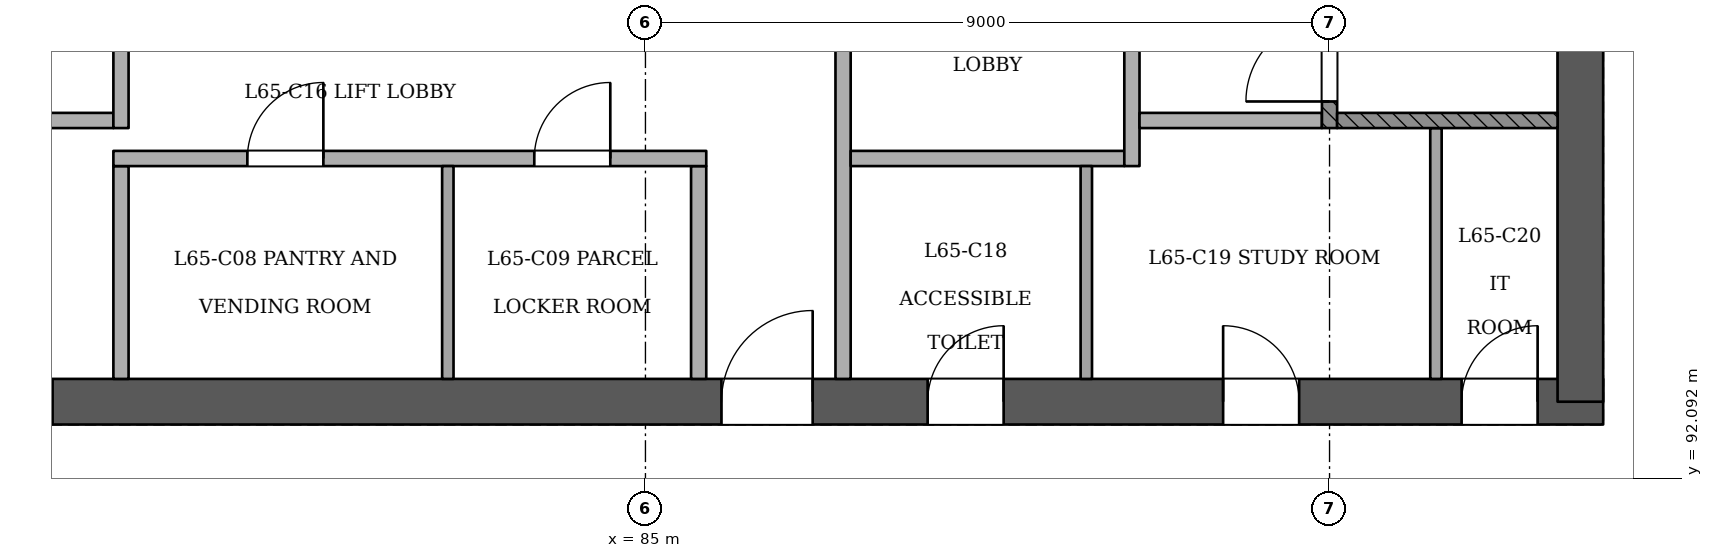
"""IFC4 building model, lengths in metres.
Left out: names, types, materials, properties, quantities, classifications, styles, units other than length and angle.
Written with IfcOpenShell. Run it as: python <this file> out.ifc"""

import sys

from ifc_helpers import new_model, si_unit, direction, frame, frame_2d, origin, place, context, subcontext, project, spatial, rectangle, extrude, element, fill, save


model = new_model("IFC4")
c1 = context("Model", 3, precision=1e-05, world=origin(), true_north=direction((0.0, 1.0)))
c2 = subcontext(c1, "Body", "Model", "MODEL_VIEW")
j1 = project(units=[si_unit("LENGTHUNIT", "METRE"), si_unit("PLANEANGLEUNIT", "RADIAN")], contexts=[c1])
p1 = place(None, origin())
s1 = spatial("IfcSite", under=j1, at=p1, CompositionType="ELEMENT")
p2 = place(p1, origin())
s2 = spatial("IfcBuilding", under=s1, at=p2, CompositionType="ELEMENT")
p3 = place(p2, frame((0.0, 0.0, 253.6)))
s3 = spatial("IfcBuildingStorey", under=s2, at=p3, CompositionType="ELEMENT", Elevation=253.6)
p4 = place(p3, frame((72.7, 93.1, 0.0), z_axis=(0.0, 0.0, 1.0), x_axis=(1.0, 0.0, 0.0)))
e1 = element("IfcWall", 1, at=p4, inside=s3, PredefinedType="SHEAR", context=c2, shape_type="SweptSolid", body=[
    extrude(rectangle(XDim=24.9, YDim=0.6, at=frame_2d((12.45, 0.0))), origin(), (0.0, 0.0, 1.0), 3.6),
])
p5 = place(p4, frame((1.1, 0.0, 0.0)))
e2 = element("IfcOpeningElement", 2, at=p5, cuts=e1, PredefinedType="OPENING", context=c2, shape_type="SweptSolid", body=[
    extrude(rectangle(XDim=1.2, YDim=2.1, at=frame_2d((0.6, 1.05))), frame((0.0, 0.311, 0.0), z_axis=(0.0, -1.0, 0.0), x_axis=(1.0, 0.0, 0.0)), (0.0, 0.0, 1.0), 0.621),
])
p6 = place(p4, frame((3.3, 0.0, 0.0)))
e3 = element("IfcOpeningElement", 3, at=p6, cuts=e1, PredefinedType="OPENING", context=c2, shape_type="SweptSolid", body=[
    extrude(rectangle(XDim=1.2, YDim=2.1, at=frame_2d((0.6, 1.05))), frame((0.0, 0.311, 0.0), z_axis=(0.0, -1.0, 0.0), x_axis=(1.0, 0.0, 0.0)), (0.0, 0.0, 1.0), 0.621),
])
p7 = place(p4, frame((13.3, 0.0, 0.0)))
e4 = element("IfcOpeningElement", 4, at=p7, cuts=e1, PredefinedType="OPENING", context=c2, shape_type="SweptSolid", body=[
    extrude(rectangle(XDim=1.2, YDim=2.1, at=frame_2d((0.6, 1.05))), frame((0.0, 0.311, 0.0), z_axis=(0.0, -1.0, 0.0), x_axis=(1.0, 0.0, 0.0)), (0.0, 0.0, 1.0), 0.621),
])
p8 = place(p4, frame((16.012, 0.0, 0.0)))
e5 = element("IfcOpeningElement", 5, at=p8, cuts=e1, PredefinedType="OPENING", context=c2, shape_type="SweptSolid", body=[
    extrude(rectangle(XDim=1.0, YDim=2.1, at=frame_2d((0.5, 1.05))), frame((0.0, 0.311, 0.0), z_axis=(0.0, -1.0, 0.0), x_axis=(1.0, 0.0, 0.0)), (0.0, 0.0, 1.0), 0.621),
])
p9 = place(p4, frame((19.9, 0.0, 0.0)))
e6 = element("IfcOpeningElement", 6, at=p9, cuts=e1, PredefinedType="OPENING", context=c2, shape_type="SweptSolid", body=[
    extrude(rectangle(XDim=1.0, YDim=2.1, at=frame_2d((0.5, 1.05))), frame((0.0, 0.311, 0.0), z_axis=(0.0, -1.0, 0.0), x_axis=(1.0, 0.0, 0.0)), (0.0, 0.0, 1.0), 0.621),
])
p10 = place(p4, frame((23.038, 0.0, 0.0)))
e7 = element("IfcOpeningElement", 7, at=p10, cuts=e1, PredefinedType="OPENING", context=c2, shape_type="SweptSolid", body=[
    extrude(rectangle(XDim=1.0, YDim=2.1, at=frame_2d((0.5, 1.05))), frame((0.0, 0.311, 0.0), z_axis=(0.0, -1.0, 0.0), x_axis=(1.0, 0.0, 0.0)), (0.0, 0.0, 1.0), 0.621),
])
p11 = place(p3, frame((97.3, 93.1, 0.0), z_axis=(0.0, 0.0, 1.0), x_axis=(0.0, 1.0, 0.0)))
e8 = element("IfcWall", 8, at=p11, inside=s3, PredefinedType="SHEAR", context=c2, shape_type="SweptSolid", body=[
    extrude(rectangle(XDim=10.9, YDim=0.6, at=frame_2d((5.45, 0.0))), origin(), (0.0, 0.0, 1.0), 3.6),
])
p12 = place(p3, frame((78.1, 93.4, 0.0), z_axis=(0.0, 0.0, 1.0), x_axis=(0.0, 1.0, 0.0)))
e9 = element("IfcWall", 9, at=p12, inside=s3, PredefinedType="PARTITIONING", context=c2, shape_type="SweptSolid", body=[
    extrude(rectangle(XDim=2.8, YDim=0.2, at=frame_2d((1.4, 0.0))), origin(), (0.0, 0.0, 1.0), 3.2),
])
p13 = place(p3, frame((82.4, 93.4, 0.0), z_axis=(0.0, 0.0, 1.0), x_axis=(0.0, 1.0, 0.0)))
e10 = element("IfcWall", 10, at=p13, inside=s3, PredefinedType="PARTITIONING", context=c2, shape_type="SweptSolid", body=[
    extrude(rectangle(XDim=2.8, YDim=0.15, at=frame_2d((1.4, 0.0))), origin(), (0.0, 0.0, 1.0), 3.2),
])
p14 = place(p3, frame((85.7, 93.4, 0.0), z_axis=(0.0, 0.0, 1.0), x_axis=(0.0, 1.0, 0.0)))
e11 = element("IfcWall", 11, at=p14, inside=s3, PredefinedType="PARTITIONING", context=c2, shape_type="SweptSolid", body=[
    extrude(rectangle(XDim=2.8, YDim=0.2, at=frame_2d((1.4, 0.0))), origin(), (0.0, 0.0, 1.0), 3.2),
])
p15 = place(p3, frame((87.6, 93.4, 0.0), z_axis=(0.0, 0.0, 1.0), x_axis=(0.0, 1.0, 0.0)))
e12 = element("IfcWall", 12, at=p15, inside=s3, PredefinedType="PARTITIONING", context=c2, shape_type="SweptSolid", body=[
    extrude(rectangle(XDim=7.0, YDim=0.2, at=frame_2d((3.5, 0.0))), origin(), (0.0, 0.0, 1.0), 3.2),
])
p16 = place(p15, frame((4.45, 0.0, 0.0)))
e13 = element("IfcOpeningElement", 13, at=p16, cuts=e12, PredefinedType="OPENING", context=c2, shape_type="SweptSolid", body=[
    extrude(rectangle(XDim=1.1, YDim=2.1, at=frame_2d((0.55, 1.05))), frame((0.0, 0.11, 0.0), z_axis=(0.0, -1.0, 0.0), x_axis=(1.0, 0.0, 0.0)), (0.0, 0.0, 1.0), 0.221),
])
p17 = place(p3, frame((90.8, 93.4, 0.0), z_axis=(0.0, 0.0, 1.0), x_axis=(0.0, 1.0, 0.0)))
e14 = element("IfcWall", 14, at=p17, inside=s3, PredefinedType="PARTITIONING", context=c2, shape_type="SweptSolid", body=[
    extrude(rectangle(XDim=2.8, YDim=0.15, at=frame_2d((1.4, 0.0))), origin(), (0.0, 0.0, 1.0), 3.2),
])
p18 = place(p3, frame((95.4, 93.4, 0.0), z_axis=(0.0, 0.0, 1.0), x_axis=(0.0, 1.0, 0.0)))
e15 = element("IfcWall", 15, at=p18, inside=s3, PredefinedType="PARTITIONING", context=c2, shape_type="SweptSolid", body=[
    extrude(rectangle(XDim=3.3, YDim=0.15, at=frame_2d((1.65, 0.0))), origin(), (0.0, 0.0, 1.0), 3.2),
])
p19 = place(p3, frame((78.0, 96.3, 0.0), z_axis=(0.0, 0.0, 1.0), x_axis=(1.0, 0.0, 0.0)))
e16 = element("IfcWall", 16, at=p19, inside=s3, PredefinedType="PARTITIONING", context=c2, shape_type="SweptSolid", body=[
    extrude(rectangle(XDim=7.8, YDim=0.2, at=frame_2d((3.9, 0.0))), origin(), (0.0, 0.0, 1.0), 3.2),
])
p20 = place(p19, frame((1.762, 0.0, 0.0)))
e17 = element("IfcOpeningElement", 17, at=p20, cuts=e16, PredefinedType="OPENING", context=c2, shape_type="SweptSolid", body=[
    extrude(rectangle(XDim=1.0, YDim=2.1, at=frame_2d((0.5, 1.05))), frame((0.0, 0.11, 0.0), z_axis=(0.0, -1.0, 0.0), x_axis=(1.0, 0.0, 0.0)), (0.0, 0.0, 1.0), 0.221),
])
p21 = place(p19, frame((5.538, 0.0, 0.0)))
e18 = element("IfcOpeningElement", 18, at=p21, cuts=e16, PredefinedType="OPENING", context=c2, shape_type="SweptSolid", body=[
    extrude(rectangle(XDim=1.0, YDim=2.1, at=frame_2d((0.5, 1.05))), frame((0.0, 0.11, 0.0), z_axis=(0.0, -1.0, 0.0), x_axis=(1.0, 0.0, 0.0)), (0.0, 0.0, 1.0), 0.221),
])
p22 = place(p3, frame((87.7, 96.3, 0.0), z_axis=(0.0, 0.0, 1.0), x_axis=(1.0, 0.0, 0.0)))
e19 = element("IfcWall", 19, at=p22, inside=s3, PredefinedType="PARTITIONING", context=c2, shape_type="SweptSolid", body=[
    extrude(rectangle(XDim=3.6, YDim=0.2, at=frame_2d((1.8, 0.0))), origin(), (0.0, 0.0, 1.0), 3.2),
])
p23 = place(p3, frame((91.4, 96.2, 0.0), z_axis=(0.0, 0.0, 1.0), x_axis=(0.0, 1.0, 0.0)))
e20 = element("IfcWall", 20, at=p23, inside=s3, PredefinedType="PARTITIONING", context=c2, shape_type="SweptSolid", body=[
    extrude(rectangle(XDim=4.2, YDim=0.2, at=frame_2d((2.1, 0.0))), origin(), (0.0, 0.0, 1.0), 3.2),
])
p24 = place(p23, frame((2.45, 0.0, 0.0)))
e21 = element("IfcOpeningElement", 21, at=p24, cuts=e20, PredefinedType="OPENING", context=c2, shape_type="SweptSolid", body=[
    extrude(rectangle(XDim=1.1, YDim=2.1, at=frame_2d((0.55, 1.05))), frame((0.0, 0.11, 0.0), z_axis=(0.0, -1.0, 0.0), x_axis=(1.0, 0.0, 0.0)), (0.0, 0.0, 1.0), 0.221),
])
p25 = place(p3, frame((76.1, 96.8, 0.0), z_axis=(0.0, 0.0, 1.0), x_axis=(1.0, 0.0, 0.0)))
e22 = element("IfcWall", 22, at=p25, inside=s3, PredefinedType="PARTITIONING", context=c2, shape_type="SweptSolid", body=[
    extrude(rectangle(XDim=1.9, YDim=0.2, at=frame_2d((0.95, 0.0))), origin(), (0.0, 0.0, 1.0), 3.2),
])
p26 = place(p3, frame((78.1, 96.7, 0.0), z_axis=(0.0, 0.0, 1.0), x_axis=(0.0, 1.0, 0.0)))
e23 = element("IfcWall", 23, at=p26, inside=s3, PredefinedType="PARTITIONING", context=c2, shape_type="SweptSolid", body=[
    extrude(rectangle(XDim=3.7, YDim=0.2, at=frame_2d((1.85, 0.0))), origin(), (0.0, 0.0, 1.0), 3.2),
])
p27 = place(p26, frame((1.95, 0.0, 0.0)))
e24 = element("IfcOpeningElement", 24, at=p27, cuts=e23, PredefinedType="OPENING", context=c2, shape_type="SweptSolid", body=[
    extrude(rectangle(XDim=1.1, YDim=2.1, at=frame_2d((0.55, 1.05))), frame((0.0, 0.11, 0.0), z_axis=(0.0, -1.0, 0.0), x_axis=(1.0, 0.0, 0.0)), (0.0, 0.0, 1.0), 0.221),
])
p28 = place(p3, frame((91.5, 96.8, 0.0), z_axis=(0.0, 0.0, 1.0), x_axis=(1.0, 0.0, 0.0)))
e25 = element("IfcWall", 25, at=p28, inside=s3, PredefinedType="PARTITIONING", context=c2, shape_type="SweptSolid", body=[
    extrude(rectangle(XDim=2.4, YDim=0.2, at=frame_2d((1.2, 0.0))), origin(), (0.0, 0.0, 1.0), 3.2),
])
p29 = place(p3, frame((94.0, 96.7, 0.0), z_axis=(0.0, 0.0, 1.0), x_axis=(0.0, 1.0, 0.0)))
e26 = element("IfcWall", 26, at=p29, inside=s3, PredefinedType="SOLIDWALL", context=c2, shape_type="SweptSolid", body=[
    extrude(rectangle(XDim=3.7, YDim=0.2, at=frame_2d((1.85, 0.0))), origin(), (0.0, 0.0, 1.0), 3.2),
])
p30 = place(p29, frame((0.35, 0.0, 0.0)))
e27 = element("IfcOpeningElement", 27, at=p30, cuts=e26, PredefinedType="OPENING", context=c2, shape_type="SweptSolid", body=[
    extrude(rectangle(XDim=1.1, YDim=2.1, at=frame_2d((0.55, 1.05))), frame((0.0, 0.11, 0.0), z_axis=(0.0, -1.0, 0.0), x_axis=(1.0, 0.0, 0.0)), (0.0, 0.0, 1.0), 0.221),
])
p31 = place(p3, frame((94.1, 96.8, 0.0), z_axis=(0.0, 0.0, 1.0), x_axis=(1.0, 0.0, 0.0)))
e28 = element("IfcWall", 28, at=p31, inside=s3, PredefinedType="SOLIDWALL", context=c2, shape_type="SweptSolid", body=[
    extrude(rectangle(XDim=2.9, YDim=0.2, at=frame_2d((1.45, 0.0))), origin(), (0.0, 0.0, 1.0), 3.2),
])
p32 = place(p30, origin())
e29 = element("IfcDoor", 29, at=p32, inside=s3, OperationType="SINGLE_SWING_LEFT", PredefinedType="NOTDEFINED", context=c2, shape_type="SweptSolid", body=[
    extrude(rectangle(XDim=1.1, YDim=2.1, at=frame_2d((0.55, 1.05))), frame((0.0, 0.025, 0.0), z_axis=(0.0, -1.0, 0.0), x_axis=(1.0, 0.0, 0.0)), (0.0, 0.0, 1.0), 0.05),
])
fill(e27, e29)
p33 = place(p6, origin())
e30 = element("IfcDoor", 30, at=p33, inside=s3, OperationType="SINGLE_SWING_LEFT", PredefinedType="NOTDEFINED", context=c2, shape_type="SweptSolid", body=[
    extrude(rectangle(XDim=1.2, YDim=2.1, at=frame_2d((0.6, 1.05))), frame((0.0, 0.025, 0.0), z_axis=(0.0, -1.0, 0.0), x_axis=(1.0, 0.0, 0.0)), (0.0, 0.0, 1.0), 0.05),
])
fill(e3, e30)
p34 = place(p7, origin())
e31 = element("IfcDoor", 31, at=p34, inside=s3, OperationType="SINGLE_SWING_RIGHT", PredefinedType="NOTDEFINED", context=c2, shape_type="SweptSolid", body=[
    extrude(rectangle(XDim=1.2, YDim=2.1, at=frame_2d((0.6, 1.05))), frame((0.0, 0.025, 0.0), z_axis=(0.0, -1.0, 0.0), x_axis=(1.0, 0.0, 0.0)), (0.0, 0.0, 1.0), 0.05),
])
fill(e4, e31)
p35 = place(p8, origin())
e32 = element("IfcDoor", 32, at=p35, inside=s3, OperationType="SINGLE_SWING_RIGHT", PredefinedType="NOTDEFINED", context=c2, shape_type="SweptSolid", body=[
    extrude(rectangle(XDim=1.0, YDim=2.1, at=frame_2d((0.5, 1.05))), frame((0.0, 0.025, 0.0), z_axis=(0.0, -1.0, 0.0), x_axis=(1.0, 0.0, 0.0)), (0.0, 0.0, 1.0), 0.05),
])
fill(e5, e32)
p36 = place(p9, origin())
e33 = element("IfcDoor", 33, at=p36, inside=s3, OperationType="SINGLE_SWING_LEFT", PredefinedType="NOTDEFINED", context=c2, shape_type="SweptSolid", body=[
    extrude(rectangle(XDim=1.0, YDim=2.1, at=frame_2d((0.5, 1.05))), frame((0.0, 0.025, 0.0), z_axis=(0.0, -1.0, 0.0), x_axis=(1.0, 0.0, 0.0)), (0.0, 0.0, 1.0), 0.05),
])
fill(e6, e33)
p37 = place(p10, origin())
e34 = element("IfcDoor", 34, at=p37, inside=s3, OperationType="SINGLE_SWING_RIGHT", PredefinedType="NOTDEFINED", context=c2, shape_type="SweptSolid", body=[
    extrude(rectangle(XDim=1.0, YDim=2.1, at=frame_2d((0.5, 1.05))), frame((0.0, 0.025, 0.0), z_axis=(0.0, -1.0, 0.0), x_axis=(1.0, 0.0, 0.0)), (0.0, 0.0, 1.0), 0.05),
])
fill(e7, e34)
p38 = place(p20, origin())
e35 = element("IfcDoor", 35, at=p38, inside=s3, OperationType="SINGLE_SWING_RIGHT", PredefinedType="NOTDEFINED", context=c2, shape_type="SweptSolid", body=[
    extrude(rectangle(XDim=1.0, YDim=2.1, at=frame_2d((0.5, 1.05))), frame((0.0, 0.025, 0.0), z_axis=(0.0, -1.0, 0.0), x_axis=(1.0, 0.0, 0.0)), (0.0, 0.0, 1.0), 0.05),
])
fill(e17, e35)
p39 = place(p21, origin())
e36 = element("IfcDoor", 36, at=p39, inside=s3, OperationType="SINGLE_SWING_RIGHT", PredefinedType="NOTDEFINED", context=c2, shape_type="SweptSolid", body=[
    extrude(rectangle(XDim=1.0, YDim=2.1, at=frame_2d((0.5, 1.05))), frame((0.0, 0.025, 0.0), z_axis=(0.0, -1.0, 0.0), x_axis=(1.0, 0.0, 0.0)), (0.0, 0.0, 1.0), 0.05),
])
fill(e18, e36)
save(model, sys.argv[1])
